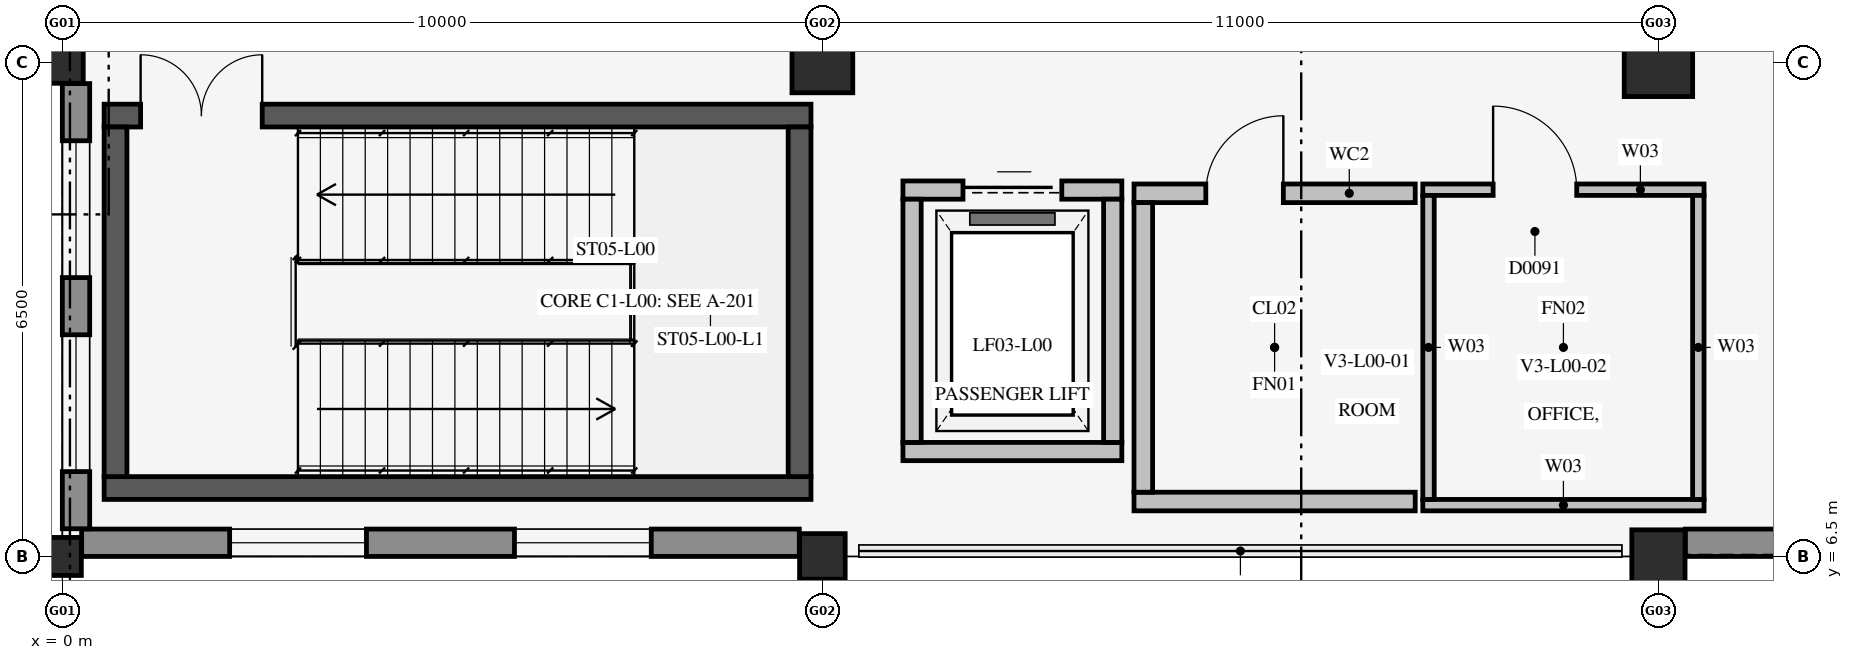
"""IFC4 building model, lengths in metres.
Left out: names, types, materials, properties, quantities, classifications, styles, units other than length and angle.
Written with IfcOpenShell. Run it as: python <this file> out.ifc"""

import sys

from ifc_helpers import new_model, si_unit, direction, frame, frame_2d, origin, origin_2d, place, context, subcontext, project, spatial, rectangle, extrude, element, fill, save


model = new_model("IFC4")
c1 = context("Model", 3, precision=1e-05, world=origin(), true_north=direction((0.0, 1.0)))
c2 = subcontext(c1, "Body", "Model", "MODEL_VIEW")
j1 = project(units=[si_unit("LENGTHUNIT", "METRE"), si_unit("PLANEANGLEUNIT", "RADIAN")], contexts=[c1])
p1 = place(None, origin())
s1 = spatial("IfcSite", under=j1, at=p1, CompositionType="ELEMENT")
p2 = place(p1, origin())
s2 = spatial("IfcBuilding", under=s1, at=p2, CompositionType="ELEMENT")
p3 = place(p2, origin())
s3 = spatial("IfcBuildingStorey", under=s2, at=p3, CompositionType="ELEMENT", Elevation=0.0)
p4 = place(p3, frame((0.55, 7.4, 0.0), z_axis=(0.0, 0.0, 1.0), x_axis=(1.0, 0.0, 0.0)))
e1 = element("IfcWall", 1, at=p4, inside=s3, PredefinedType="SHEAR", context=c2, shape_type="SweptSolid", body=[
    extrude(rectangle(XDim=9.3, YDim=0.3, at=frame_2d((4.65, 0.0))), origin(), (0.0, 0.0, 1.0), 5.16),
])
p5 = place(p3, frame((0.55, 12.3, 0.0), z_axis=(0.0, 0.0, 1.0), x_axis=(1.0, 0.0, 0.0)))
e2 = element("IfcWall", 2, at=p5, inside=s3, PredefinedType="SHEAR", context=c2, shape_type="SweptSolid", body=[
    extrude(rectangle(XDim=9.3, YDim=0.3, at=frame_2d((4.65, 0.0))), origin(), (0.0, 0.0, 1.0), 5.16),
])
p6 = place(p5, frame((0.48, 0.0, 0.0)))
e3 = element("IfcOpeningElement", 3, at=p6, cuts=e2, PredefinedType="OPENING", context=c2, shape_type="SweptSolid", body=[
    extrude(rectangle(XDim=1.6, YDim=2.2, at=frame_2d((0.8, 1.1))), frame((0.0, 0.162, 0.0), z_axis=(0.0, -1.0, 0.0), x_axis=(1.0, 0.0, 0.0)), (0.0, 0.0, 1.0), 0.324),
])
for number, where, z_axis, x_axis in (
    (4, (0.7, 7.55, 0.0), (0.0, 0.0, 1.0), (0.0, 1.0, 0.0)),
    (5, (9.7, 7.55, 0.0), (0.0, 0.0, 1.0), (0.0, 1.0, 0.0)),
):
    element("IfcWall", number, at=place(p3, frame(where, z_axis=z_axis, x_axis=x_axis)), inside=s3, PredefinedType="SHEAR", context=c2, shape_type="SweptSolid", body=[
        extrude(rectangle(XDim=4.6, YDim=0.3, at=frame_2d((2.3, 0.0))), origin(), (0.0, 0.0, 1.0), 5.16),
    ])
p7 = place(p3, frame((11.06, 7.88, 0.0), z_axis=(0.0, 0.0, 1.0), x_axis=(1.0, 0.0, 0.0)))
e6 = element("IfcWall", 6, at=p7, inside=s3, PredefinedType="SOLIDWALL", context=c2, shape_type="SweptSolid", body=[
    extrude(rectangle(XDim=2.88, YDim=0.24, at=frame_2d((1.44, 0.0))), origin(), (0.0, 0.0, 1.0), 5.4),
])
p8 = place(p3, frame((11.06, 11.32, 0.0), z_axis=(0.0, 0.0, 1.0), x_axis=(1.0, 0.0, 0.0)))
e7 = element("IfcWall", 7, at=p8, inside=s3, PredefinedType="SOLIDWALL", context=c2, shape_type="SweptSolid", body=[
    extrude(rectangle(XDim=2.88, YDim=0.24, at=frame_2d((1.44, 0.0))), origin(), (0.0, 0.0, 1.0), 5.4),
])
p9 = place(p8, frame((0.79, 0.0, 0.0)))
e8 = element("IfcOpeningElement", 8, at=p9, cuts=e7, PredefinedType="OPENING", context=c2, shape_type="SweptSolid", body=[
    extrude(rectangle(XDim=1.3, YDim=2.25, at=frame_2d((0.65, 1.125))), frame((0.0, 0.132, 0.0), z_axis=(0.0, -1.0, 0.0), x_axis=(1.0, 0.0, 0.0)), (0.0, 0.0, 1.0), 0.264),
])
for number, where, z_axis, x_axis in (
    (9, (11.18, 8.0, 0.0), (0.0, 0.0, 1.0), (0.0, 1.0, 0.0)),
    (10, (13.82, 8.0, 0.0), (0.0, 0.0, 1.0), (0.0, 1.0, 0.0)),
):
    element("IfcWall", number, at=place(p3, frame(where, z_axis=z_axis, x_axis=x_axis)), inside=s3, PredefinedType="SOLIDWALL", context=c2, shape_type="SweptSolid", body=[
        extrude(rectangle(XDim=3.2, YDim=0.24, at=frame_2d((1.6, 0.0))), origin(), (0.0, 0.0, 1.0), 5.4),
    ])
p10 = place(p3, frame((0.0, 6.5, 0.0), z_axis=(0.0, 0.0, 1.0), x_axis=(1.0, 0.0, 0.0)))
e11 = element("IfcColumn", 11, at=p10, inside=s3, PredefinedType="COLUMN", context=c2, shape_type="SweptSolid", body=[
    extrude(rectangle(XDim=0.5, YDim=0.5, at=origin_2d()), origin(), (0.0, 0.0, 1.0), 5.4),
])
p11 = place(p3, frame((0.0, 13.0, 0.0), z_axis=(0.0, 0.0, 1.0), x_axis=(1.0, 0.0, 0.0)))
e12 = element("IfcColumn", 12, at=p11, inside=s3, PredefinedType="COLUMN", context=c2, shape_type="SweptSolid", body=[
    extrude(rectangle(XDim=0.55, YDim=0.55, at=origin_2d()), origin(), (0.0, 0.0, 1.0), 5.4),
])
p12 = place(p3, frame((10.0, 6.5, 0.0), z_axis=(0.0, 0.0, 1.0), x_axis=(1.0, 0.0, 0.0)))
e13 = element("IfcColumn", 13, at=p12, inside=s3, PredefinedType="COLUMN", context=c2, shape_type="SweptSolid", body=[
    extrude(rectangle(XDim=0.6, YDim=0.6, at=origin_2d()), origin(), (0.0, 0.0, 1.0), 5.4),
])
p13 = place(p3, frame((10.0, 13.0, 0.0), z_axis=(0.0, 0.0, 1.0), x_axis=(1.0, 0.0, 0.0)))
e14 = element("IfcColumn", 14, at=p13, inside=s3, PredefinedType="COLUMN", context=c2, shape_type="SweptSolid", body=[
    extrude(rectangle(XDim=0.8, YDim=0.8, at=origin_2d()), origin(), (0.0, 0.0, 1.0), 5.4),
])
p14 = place(p3, frame((21.0, 6.5, 0.0), z_axis=(0.0, 0.0, 1.0), x_axis=(1.0, 0.0, 0.0)))
e15 = element("IfcColumn", 15, at=p14, inside=s3, PredefinedType="COLUMN", context=c2, shape_type="SweptSolid", body=[
    extrude(rectangle(XDim=0.7, YDim=0.7, at=origin_2d()), origin(), (0.0, 0.0, 1.0), 5.4),
])
p15 = place(p3, frame((21.0, 13.0, 0.0), z_axis=(0.0, 0.0, 1.0), x_axis=(1.0, 0.0, 0.0)))
e16 = element("IfcColumn", 16, at=p15, inside=s3, PredefinedType="COLUMN", context=c2, shape_type="SweptSolid", body=[
    extrude(rectangle(XDim=0.9, YDim=0.9, at=origin_2d()), origin(), (0.0, 0.0, 1.0), 5.4),
])
p16 = place(p3, frame((14.1, 7.222, 0.0), z_axis=(0.0, 0.0, 1.0), x_axis=(1.0, 0.0, 0.0)))
e17 = element("IfcWall", 17, at=p16, inside=s3, PredefinedType="SOLIDWALL", context=c2, shape_type="SweptSolid", body=[
    extrude(rectangle(XDim=3.7, YDim=0.245, at=frame_2d((1.85, 0.0))), origin(), (0.0, 0.0, 1.0), 5.145),
])
p17 = place(p3, frame((14.1, 11.278, 0.0), z_axis=(0.0, 0.0, 1.0), x_axis=(1.0, 0.0, 0.0)))
e18 = element("IfcWall", 18, at=p17, inside=s3, PredefinedType="SOLIDWALL", context=c2, shape_type="SweptSolid", body=[
    extrude(rectangle(XDim=3.7, YDim=0.245, at=frame_2d((1.85, 0.0))), origin(), (0.0, 0.0, 1.0), 5.145),
])
p18 = place(p17, frame((0.945, 0.0, 0.0)))
e19 = element("IfcOpeningElement", 19, at=p18, cuts=e18, PredefinedType="OPENING", context=c2, shape_type="SweptSolid", body=[
    extrude(rectangle(XDim=1.02, YDim=2.2, at=frame_2d((0.51, 1.1))), frame((0.0, 0.135, 0.0), z_axis=(0.0, -1.0, 0.0), x_axis=(1.0, 0.0, 0.0)), (0.0, 0.0, 1.0), 0.269),
])
p19 = place(p3, frame((14.222, 7.345, 0.0), z_axis=(0.0, 0.0, 1.0), x_axis=(0.0, 1.0, 0.0)))
e20 = element("IfcWall", 20, at=p19, inside=s3, PredefinedType="SOLIDWALL", context=c2, shape_type="SweptSolid", body=[
    extrude(rectangle(XDim=3.81, YDim=0.245, at=frame_2d((1.905, 0.0))), origin(), (0.0, 0.0, 1.0), 5.145),
])
p20 = place(p3, frame((17.9, 7.175, 0.0), z_axis=(0.0, 0.0, 1.0), x_axis=(1.0, 0.0, 0.0)))
e21 = element("IfcWall", 21, at=p20, inside=s3, PredefinedType="PARTITIONING", context=c2, shape_type="SweptSolid", body=[
    extrude(rectangle(XDim=3.7, YDim=0.15, at=frame_2d((1.85, 0.0))), origin(), (0.0, 0.0, 1.0), 5.145),
])
p21 = place(p3, frame((17.9, 11.325, 0.0), z_axis=(0.0, 0.0, 1.0), x_axis=(1.0, 0.0, 0.0)))
e22 = element("IfcWall", 22, at=p21, inside=s3, PredefinedType="PARTITIONING", context=c2, shape_type="SweptSolid", body=[
    extrude(rectangle(XDim=3.7, YDim=0.15, at=frame_2d((1.85, 0.0))), origin(), (0.0, 0.0, 1.0), 5.145),
])
p22 = place(p21, frame((0.925, 0.0, 0.0)))
e23 = element("IfcOpeningElement", 23, at=p22, cuts=e22, PredefinedType="OPENING", context=c2, shape_type="SweptSolid", body=[
    extrude(rectangle(XDim=1.1, YDim=2.25, at=frame_2d((0.55, 1.125))), frame((0.0, 0.087, 0.0), z_axis=(0.0, -1.0, 0.0), x_axis=(1.0, 0.0, 0.0)), (0.0, 0.0, 1.0), 0.174),
])
for number, where, z_axis, x_axis in (
    (24, (21.525, 7.25, 0.0), (0.0, 0.0, 1.0), (0.0, 1.0, 0.0)),
    (25, (17.975, 7.25, 0.0), (0.0, 0.0, 1.0), (0.0, 1.0, 0.0)),
):
    element("IfcWall", number, at=place(p3, frame(where, z_axis=z_axis, x_axis=x_axis)), inside=s3, PredefinedType="PARTITIONING", context=c2, shape_type="SweptSolid", body=[
        extrude(rectangle(XDim=4.0, YDim=0.15, at=frame_2d((2.0, 0.0))), origin(), (0.0, 0.0, 1.0), 5.145),
    ])
p23 = place(p3, frame((0.254, 6.68, 0.0), z_axis=(0.0, 0.0, 1.0), x_axis=(1.0, 0.0, 0.0)))
e26 = element("IfcWall", 26, at=p23, inside=s3, PredefinedType="SOLIDWALL", context=c2, shape_type="SweptSolid", body=[
    extrude(rectangle(XDim=9.442, YDim=0.36, at=frame_2d((4.721, 0.0))), origin(), (0.0, 0.0, 1.0), 4.67),
])
p24 = place(p23, frame((1.947, 0.0, 0.95)))
e27 = element("IfcOpeningElement", 27, at=p24, cuts=e26, PredefinedType="OPENING", context=c2, shape_type="SweptSolid", body=[
    extrude(rectangle(XDim=1.8, YDim=1.5, at=frame_2d((0.9, 0.75))), frame((0.0, 0.192, 0.0), z_axis=(0.0, -1.0, 0.0), x_axis=(1.0, 0.0, 0.0)), (0.0, 0.0, 1.0), 0.384),
])
p25 = place(p23, frame((5.695, 0.0, 0.95)))
e28 = element("IfcOpeningElement", 28, at=p25, cuts=e26, PredefinedType="OPENING", context=c2, shape_type="SweptSolid", body=[
    extrude(rectangle(XDim=1.8, YDim=1.5, at=frame_2d((0.9, 0.75))), frame((0.0, 0.192, 0.0), z_axis=(0.0, -1.0, 0.0), x_axis=(1.0, 0.0, 0.0)), (0.0, 0.0, 1.0), 0.384),
])
p26 = place(p3, frame((21.354, 6.68, 0.0), z_axis=(0.0, 0.0, 1.0), x_axis=(1.0, 0.0, 0.0)))
e29 = element("IfcWall", 29, at=p26, inside=s3, PredefinedType="SOLIDWALL", context=c2, shape_type="SweptSolid", body=[
    extrude(rectangle(XDim=6.742, YDim=0.36, at=frame_2d((3.371, 0.0))), origin(), (0.0, 0.0, 1.0), 4.518),
])
p27 = place(p26, frame((2.321, 0.0, 0.0)))
e30 = element("IfcOpeningElement", 30, at=p27, cuts=e29, PredefinedType="OPENING", context=c2, shape_type="SweptSolid", body=[
    extrude(rectangle(XDim=2.1, YDim=2.5, at=frame_2d((1.05, 1.25))), frame((0.0, 0.192, 0.0), z_axis=(0.0, -1.0, 0.0), x_axis=(1.0, 0.0, 0.0)), (0.0, 0.0, 1.0), 0.384),
])
p28 = place(p3, frame((0.18, 6.864, 0.0), z_axis=(0.0, 0.0, 1.0), x_axis=(0.0, 1.0, 0.0)))
e31 = element("IfcWall", 31, at=p28, inside=s3, PredefinedType="SOLIDWALL", context=c2, shape_type="SweptSolid", body=[
    extrude(rectangle(XDim=5.857, YDim=0.36, at=frame_2d((2.928, 0.0))), origin(), (0.0, 0.0, 1.0), 4.594),
])
p29 = place(p28, frame((0.752, 0.0, 0.95)))
e32 = element("IfcOpeningElement", 32, at=p29, cuts=e31, PredefinedType="OPENING", context=c2, shape_type="SweptSolid", body=[
    extrude(rectangle(XDim=1.8, YDim=1.8, at=frame_2d((0.9, 0.9))), frame((0.0, 0.192, 0.0), z_axis=(0.0, -1.0, 0.0), x_axis=(1.0, 0.0, 0.0)), (0.0, 0.0, 1.0), 0.384),
])
p30 = place(p28, frame((3.305, 0.0, 0.95)))
e33 = element("IfcOpeningElement", 33, at=p30, cuts=e31, PredefinedType="OPENING", context=c2, shape_type="SweptSolid", body=[
    extrude(rectangle(XDim=1.8, YDim=1.8, at=frame_2d((0.9, 0.9))), frame((0.0, 0.192, 0.0), z_axis=(0.0, -1.0, 0.0), x_axis=(1.0, 0.0, 0.0)), (0.0, 0.0, 1.0), 0.384),
])
p31 = place(p6, origin())
e34 = element("IfcDoor", 34, at=p31, inside=s3, OperationType="DOUBLE_DOOR_SINGLE_SWING", PredefinedType="DOOR", context=c2, shape_type="SweptSolid", body=[
    extrude(rectangle(XDim=1.6, YDim=2.2, at=frame_2d((0.8, 1.1))), frame((0.0, 0.025, 0.0), z_axis=(0.0, -1.0, 0.0), x_axis=(1.0, 0.0, 0.0)), (0.0, 0.0, 1.0), 0.05),
])
fill(e3, e34)
p32 = place(p18, frame((1.02, 0.0, 0.0), z_axis=(0.0, 0.0, 1.0), x_axis=(-1.0, 0.0, 0.0)))
e35 = element("IfcDoor", 35, at=p32, inside=s3, OperationType="SINGLE_SWING_RIGHT", PredefinedType="DOOR", context=c2, shape_type="SweptSolid", body=[
    extrude(rectangle(XDim=1.02, YDim=2.2, at=frame_2d((0.51, 1.1))), frame((0.0, 0.025, 0.0), z_axis=(0.0, -1.0, 0.0), x_axis=(1.0, 0.0, 0.0)), (0.0, 0.0, 1.0), 0.05),
])
fill(e19, e35)
p33 = place(p22, frame((1.1, 0.0, 0.0), z_axis=(0.0, 0.0, 1.0), x_axis=(-1.0, 0.0, 0.0)))
e36 = element("IfcDoor", 36, at=p33, inside=s3, OperationType="SINGLE_SWING_LEFT", PredefinedType="DOOR", context=c2, shape_type="SweptSolid", body=[
    extrude(rectangle(XDim=1.1, YDim=2.25, at=frame_2d((0.55, 1.125))), frame((0.0, 0.025, 0.0), z_axis=(0.0, -1.0, 0.0), x_axis=(1.0, 0.0, 0.0)), (0.0, 0.0, 1.0), 0.05),
])
fill(e23, e36)
p34 = place(p24, origin())
e37 = element("IfcWindow", 37, at=p34, inside=s3, PartitioningType="SINGLE_PANEL", PredefinedType="WINDOW", context=c2, shape_type="SweptSolid", body=[
    extrude(rectangle(XDim=1.8, YDim=1.5, at=frame_2d((0.9, 0.75))), frame((0.0, 0.03, 0.0), z_axis=(0.0, -1.0, 0.0), x_axis=(1.0, 0.0, 0.0)), (0.0, 0.0, 1.0), 0.06),
])
fill(e27, e37)
p35 = place(p25, origin())
e38 = element("IfcWindow", 38, at=p35, inside=s3, PartitioningType="SINGLE_PANEL", PredefinedType="WINDOW", context=c2, shape_type="SweptSolid", body=[
    extrude(rectangle(XDim=1.8, YDim=1.5, at=frame_2d((0.9, 0.75))), frame((0.0, 0.03, 0.0), z_axis=(0.0, -1.0, 0.0), x_axis=(1.0, 0.0, 0.0)), (0.0, 0.0, 1.0), 0.06),
])
fill(e28, e38)
p36 = place(p29, origin())
e39 = element("IfcWindow", 39, at=p36, inside=s3, PartitioningType="SINGLE_PANEL", PredefinedType="WINDOW", context=c2, shape_type="SweptSolid", body=[
    extrude(rectangle(XDim=1.8, YDim=1.8, at=frame_2d((0.9, 0.9))), frame((0.0, 0.03, 0.0), z_axis=(0.0, -1.0, 0.0), x_axis=(1.0, 0.0, 0.0)), (0.0, 0.0, 1.0), 0.06),
])
fill(e32, e39)
p37 = place(p30, origin())
e40 = element("IfcWindow", 40, at=p37, inside=s3, PartitioningType="SINGLE_PANEL", PredefinedType="WINDOW", context=c2, shape_type="SweptSolid", body=[
    extrude(rectangle(XDim=1.8, YDim=1.8, at=frame_2d((0.9, 0.9))), frame((0.0, 0.03, 0.0), z_axis=(0.0, -1.0, 0.0), x_axis=(1.0, 0.0, 0.0)), (0.0, 0.0, 1.0), 0.06),
])
fill(e33, e40)
p38 = place(p9, origin())
e41 = element("IfcDoor", 41, at=p38, inside=s3, OperationType="SLIDING_TO_LEFT", PredefinedType="USERDEFINED", context=c2, shape_type="SweptSolid", body=[
    extrude(rectangle(XDim=1.3, YDim=2.25, at=frame_2d((0.65, 1.125))), frame((0.0, 0.025, 0.0), z_axis=(0.0, -1.0, 0.0), x_axis=(1.0, 0.0, 0.0)), (0.0, 0.0, 1.0), 0.05),
])
fill(e8, e41)
save(model, sys.argv[1])
